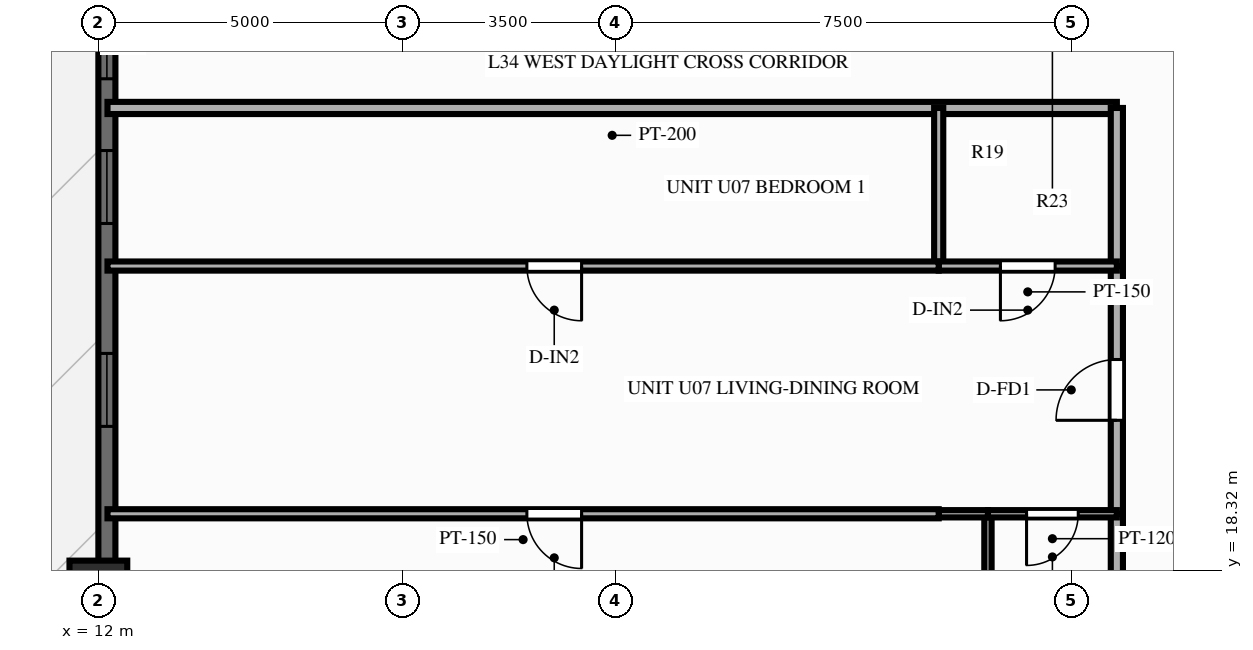
"""IFC4 building model, lengths in metres.
Left out: names, types, materials, properties, quantities, classifications, styles, units other than length and angle.
Written with IfcOpenShell. Run it as: python <this file> out.ifc"""

import sys

from ifc_helpers import new_model, si_unit, direction, frame, frame_2d, origin, origin_2d, place, context, subcontext, project, spatial, rectangle, extrude, source, transform, mapped, element, fill, save


model = new_model("IFC4")
c1 = context("Model", 3, precision=1e-05, world=origin(), true_north=direction((0.0, 1.0)))
c2 = subcontext(c1, "Body", "Model", "MODEL_VIEW")
j1 = project(units=[si_unit("LENGTHUNIT", "METRE"), si_unit("PLANEANGLEUNIT", "RADIAN")], contexts=[c1])
p1 = place(None, origin())
s1 = spatial("IfcSite", under=j1, at=p1, CompositionType="ELEMENT")
p2 = place(p1, origin())
s2 = spatial("IfcBuilding", under=s1, at=p2, CompositionType="ELEMENT")
p3 = place(p2, frame((0.0, 0.0, 107.85)))
s3 = spatial("IfcBuildingStorey", under=s2, at=p3, CompositionType="ELEMENT", Elevation=107.85)
m1 = source(origin(), c2, "Body", "SweptSolid", [
    extrude(rectangle(XDim=0.95, YDim=0.95, at=origin_2d()), origin(), (0.0, 0.0, 1.0), 3.0),
])
p4 = place(p3, frame((12.0, 18.0, 0.0), z_axis=(0.0, 0.0, 1.0), x_axis=(1.0, 0.0, 0.0)))
e1 = element("IfcColumn", 1, at=p4, inside=s3, PredefinedType="COLUMN", context=c2, shape_type="MappedRepresentation", body=[
    mapped(m1, transform((0.0, 0.0, 0.0), scale=1.0)),
])
p5 = place(p3, frame((12.14, 7.2, 0.0), z_axis=(0.0, 0.0, 1.0), x_axis=(0.0, 1.0, 0.0)))
e2 = element("IfcWall", 2, at=p5, inside=s3, PredefinedType="SOLIDWALL", context=c2, shape_type="SweptSolid", body=[
    extrude(rectangle(XDim=39.6, YDim=0.28, at=frame_2d((19.8, 0.0))), origin(), (0.0, 0.0, 1.0), 2.28),
])
p6 = place(p5, frame((0.945, 0.0, 0.25)))
e3 = element("IfcOpeningElement", 3, at=p6, cuts=e2, PredefinedType="OPENING", context=c2, shape_type="SweptSolid", body=[
    extrude(rectangle(XDim=1.2, YDim=1.5, at=frame_2d((0.6, 0.75))), frame((0.0, 0.152, 0.0), z_axis=(0.0, -1.0, 0.0), x_axis=(1.0, 0.0, 0.0)), (0.0, 0.0, 1.0), 0.304),
])
p7 = place(p5, frame((4.213, 0.0, 0.25)))
e4 = element("IfcOpeningElement", 4, at=p7, cuts=e2, PredefinedType="OPENING", context=c2, shape_type="SweptSolid", body=[
    extrude(rectangle(XDim=1.2, YDim=1.5, at=frame_2d((0.6, 0.75))), frame((0.0, 0.152, 0.0), z_axis=(0.0, -1.0, 0.0), x_axis=(1.0, 0.0, 0.0)), (0.0, 0.0, 1.0), 0.304),
])
p8 = place(p5, frame((7.55, 0.0, 0.25)))
e5 = element("IfcOpeningElement", 5, at=p8, cuts=e2, PredefinedType="OPENING", context=c2, shape_type="SweptSolid", body=[
    extrude(rectangle(XDim=1.2, YDim=1.5, at=frame_2d((0.6, 0.75))), frame((0.0, 0.152, 0.0), z_axis=(0.0, -1.0, 0.0), x_axis=(1.0, 0.0, 0.0)), (0.0, 0.0, 1.0), 0.304),
])
p9 = place(p5, frame((13.483, 0.0, 0.25)))
e6 = element("IfcOpeningElement", 6, at=p9, cuts=e2, PredefinedType="OPENING", context=c2, shape_type="SweptSolid", body=[
    extrude(rectangle(XDim=1.2, YDim=1.5, at=frame_2d((0.6, 0.75))), frame((0.0, 0.152, 0.0), z_axis=(0.0, -1.0, 0.0), x_axis=(1.0, 0.0, 0.0)), (0.0, 0.0, 1.0), 0.304),
])
p10 = place(p5, frame((16.82, 0.0, 0.25)))
e7 = element("IfcOpeningElement", 7, at=p10, cuts=e2, PredefinedType="OPENING", context=c2, shape_type="SweptSolid", body=[
    extrude(rectangle(XDim=1.2, YDim=1.5, at=frame_2d((0.6, 0.75))), frame((0.0, 0.152, 0.0), z_axis=(0.0, -1.0, 0.0), x_axis=(1.0, 0.0, 0.0)), (0.0, 0.0, 1.0), 0.304),
])
p11 = place(p5, frame((19.2, 0.0, 0.25)))
e8 = element("IfcOpeningElement", 8, at=p11, cuts=e2, PredefinedType="OPENING", context=c2, shape_type="SweptSolid", body=[
    extrude(rectangle(XDim=1.2, YDim=1.5, at=frame_2d((0.6, 0.75))), frame((0.0, 0.152, 0.0), z_axis=(0.0, -1.0, 0.0), x_axis=(1.0, 0.0, 0.0)), (0.0, 0.0, 1.0), 0.304),
])
p12 = place(p5, frame((21.578, 0.0, 0.25)))
e9 = element("IfcOpeningElement", 9, at=p12, cuts=e2, PredefinedType="OPENING", context=c2, shape_type="SweptSolid", body=[
    extrude(rectangle(XDim=1.2, YDim=1.5, at=frame_2d((0.6, 0.75))), frame((0.0, 0.152, 0.0), z_axis=(0.0, -1.0, 0.0), x_axis=(1.0, 0.0, 0.0)), (0.0, 0.0, 1.0), 0.304),
])
p13 = place(p5, frame((24.713, 0.0, 0.0)))
e10 = element("IfcOpeningElement", 10, at=p13, cuts=e2, PredefinedType="OPENING", context=c2, shape_type="SweptSolid", body=[
    extrude(rectangle(XDim=1.6, YDim=2.15, at=frame_2d((0.8, 1.075))), frame((0.0, 0.152, 0.0), z_axis=(0.0, -1.0, 0.0), x_axis=(1.0, 0.0, 0.0)), (0.0, 0.0, 1.0), 0.304),
])
p14 = place(p5, frame((29.305, 0.0, 0.25)))
e11 = element("IfcOpeningElement", 11, at=p14, cuts=e2, PredefinedType="OPENING", context=c2, shape_type="SweptSolid", body=[
    extrude(rectangle(XDim=0.7, YDim=1.5, at=frame_2d((0.35, 0.75))), frame((0.0, 0.152, 0.0), z_axis=(0.0, -1.0, 0.0), x_axis=(1.0, 0.0, 0.0)), (0.0, 0.0, 1.0), 0.304),
])
p15 = place(p5, frame((30.848, 0.0, 0.25)))
e12 = element("IfcOpeningElement", 12, at=p15, cuts=e2, PredefinedType="OPENING", context=c2, shape_type="SweptSolid", body=[
    extrude(rectangle(XDim=1.2, YDim=1.5, at=frame_2d((0.6, 0.75))), frame((0.0, 0.152, 0.0), z_axis=(0.0, -1.0, 0.0), x_axis=(1.0, 0.0, 0.0)), (0.0, 0.0, 1.0), 0.304),
])
p16 = place(p5, frame((34.183, 0.0, 0.25)))
e13 = element("IfcOpeningElement", 13, at=p16, cuts=e2, PredefinedType="OPENING", context=c2, shape_type="SweptSolid", body=[
    extrude(rectangle(XDim=1.2, YDim=1.5, at=frame_2d((0.6, 0.75))), frame((0.0, 0.152, 0.0), z_axis=(0.0, -1.0, 0.0), x_axis=(1.0, 0.0, 0.0)), (0.0, 0.0, 1.0), 0.304),
])
p17 = place(p5, frame((37.452, 0.0, 0.25)))
e14 = element("IfcOpeningElement", 14, at=p17, cuts=e2, PredefinedType="OPENING", context=c2, shape_type="SweptSolid", body=[
    extrude(rectangle(XDim=1.2, YDim=1.5, at=frame_2d((0.6, 0.75))), frame((0.0, 0.152, 0.0), z_axis=(0.0, -1.0, 0.0), x_axis=(1.0, 0.0, 0.0)), (0.0, 0.0, 1.0), 0.304),
])
p18 = place(p3, frame((28.75, 25.92, 0.0), z_axis=(0.0, 0.0, 1.0), x_axis=(-1.0, 0.0, 0.0)))
e15 = element("IfcWall", 15, at=p18, inside=s3, PredefinedType="PARTITIONING", context=c2, shape_type="SweptSolid", body=[
    extrude(rectangle(XDim=16.6, YDim=0.2, at=frame_2d((8.3, 0.0))), origin(), (0.0, 0.0, 1.0), 2.79),
])
p19 = place(p3, frame((28.75, 16.65, 0.0), z_axis=(0.0, 0.0, 1.0), x_axis=(0.0, 1.0, 0.0)))
e16 = element("IfcWall", 16, at=p19, inside=s3, PredefinedType="PARTITIONING", context=c2, shape_type="SweptSolid", body=[
    extrude(rectangle(XDim=2.596, YDim=0.2, at=frame_2d((1.298, 0.0))), origin(), (0.0, 0.0, 1.0), 2.79),
])
p20 = place(p3, frame((28.75, 19.246, 0.0), z_axis=(0.0, 0.0, 1.0), x_axis=(0.0, 1.0, 0.0)))
e17 = element("IfcWall", 17, at=p20, inside=s3, PredefinedType="PARTITIONING", context=c2, shape_type="SweptSolid", body=[
    extrude(rectangle(XDim=4.074, YDim=0.2, at=frame_2d((2.037, 0.0))), origin(), (0.0, 0.0, 1.0), 2.79),
])
p21 = place(p20, frame((1.537, 0.0, 0.0)))
e18 = element("IfcOpeningElement", 18, at=p21, cuts=e17, PredefinedType="OPENING", context=c2, shape_type="SweptSolid", body=[
    extrude(rectangle(XDim=1.0, YDim=2.15, at=frame_2d((0.5, 1.075))), frame((0.0, 0.112, 0.0), z_axis=(0.0, -1.0, 0.0), x_axis=(1.0, 0.0, 0.0)), (0.0, 0.0, 1.0), 0.224),
])
p22 = place(p3, frame((28.75, 23.32, 0.0), z_axis=(0.0, 0.0, 1.0), x_axis=(0.0, 1.0, 0.0)))
e19 = element("IfcWall", 19, at=p22, inside=s3, PredefinedType="PARTITIONING", context=c2, shape_type="SweptSolid", body=[
    extrude(rectangle(XDim=2.6, YDim=0.2, at=frame_2d((1.3, 0.0))), origin(), (0.0, 0.0, 1.0), 2.79),
])
p23 = place(p3, frame((26.63, 16.65, 0.0), z_axis=(0.0, 0.0, 1.0), x_axis=(0.0, 1.0, 0.0)))
e20 = element("IfcWall", 20, at=p23, inside=s3, PredefinedType="PARTITIONING", context=c2, shape_type="SweptSolid", body=[
    extrude(rectangle(XDim=2.596, YDim=0.12, at=frame_2d((1.298, 0.0))), origin(), (0.0, 0.0, 1.0), 2.79),
])
p24 = place(p3, frame((25.82, 23.32, 0.0), z_axis=(0.0, 0.0, 1.0), x_axis=(0.0, 1.0, 0.0)))
e21 = element("IfcWall", 21, at=p24, inside=s3, PredefinedType="PARTITIONING", context=c2, shape_type="SweptSolid", body=[
    extrude(rectangle(XDim=2.6, YDim=0.15, at=frame_2d((1.3, 0.0))), origin(), (0.0, 0.0, 1.0), 2.79),
])
p25 = place(p3, frame((28.75, 19.246, 0.0), z_axis=(0.0, 0.0, 1.0), x_axis=(-1.0, 0.0, 0.0)))
e22 = element("IfcWall", 22, at=p25, inside=s3, PredefinedType="PARTITIONING", context=c2, shape_type="SweptSolid", body=[
    extrude(rectangle(XDim=2.12, YDim=0.12, at=frame_2d((1.06, 0.0))), origin(), (0.0, 0.0, 1.0), 2.79),
])
p26 = place(p25, frame((0.635, 0.0, 0.0)))
e23 = element("IfcOpeningElement", 23, at=p26, cuts=e22, PredefinedType="OPENING", context=c2, shape_type="SweptSolid", body=[
    extrude(rectangle(XDim=0.85, YDim=2.05, at=frame_2d((0.425, 1.025))), frame((0.0, 0.072, 0.0), z_axis=(0.0, -1.0, 0.0), x_axis=(1.0, 0.0, 0.0)), (0.0, 0.0, 1.0), 0.144),
])
p27 = place(p3, frame((26.63, 19.246, 0.0), z_axis=(0.0, 0.0, 1.0), x_axis=(-1.0, 0.0, 0.0)))
e24 = element("IfcWall", 24, at=p27, inside=s3, PredefinedType="PARTITIONING", context=c2, shape_type="SweptSolid", body=[
    extrude(rectangle(XDim=0.81, YDim=0.12, at=frame_2d((0.405, 0.0))), origin(), (0.0, 0.0, 1.0), 2.79),
])
p28 = place(p3, frame((25.82, 19.246, 0.0), z_axis=(0.0, 0.0, 1.0), x_axis=(-1.0, 0.0, 0.0)))
e25 = element("IfcWall", 25, at=p28, inside=s3, PredefinedType="PARTITIONING", context=c2, shape_type="SweptSolid", body=[
    extrude(rectangle(XDim=13.67, YDim=0.15, at=frame_2d((6.835, 0.0))), origin(), (0.0, 0.0, 1.0), 2.79),
])
p29 = place(p28, frame((5.873, 0.0, 0.0)))
e26 = element("IfcOpeningElement", 26, at=p29, cuts=e25, PredefinedType="OPENING", context=c2, shape_type="SweptSolid", body=[
    extrude(rectangle(XDim=0.9, YDim=2.1, at=frame_2d((0.45, 1.05))), frame((0.0, 0.087, 0.0), z_axis=(0.0, -1.0, 0.0), x_axis=(1.0, 0.0, 0.0)), (0.0, 0.0, 1.0), 0.174),
])
p30 = place(p3, frame((28.75, 23.32, 0.0), z_axis=(0.0, 0.0, 1.0), x_axis=(-1.0, 0.0, 0.0)))
e27 = element("IfcWall", 27, at=p30, inside=s3, PredefinedType="PARTITIONING", context=c2, shape_type="SweptSolid", body=[
    extrude(rectangle(XDim=2.93, YDim=0.15, at=frame_2d((1.465, 0.0))), origin(), (0.0, 0.0, 1.0), 2.79),
])
p31 = place(p30, frame((1.015, 0.0, 0.0)))
e28 = element("IfcOpeningElement", 28, at=p31, cuts=e27, PredefinedType="OPENING", context=c2, shape_type="SweptSolid", body=[
    extrude(rectangle(XDim=0.9, YDim=2.1, at=frame_2d((0.45, 1.05))), frame((0.0, 0.087, 0.0), z_axis=(0.0, -1.0, 0.0), x_axis=(1.0, 0.0, 0.0)), (0.0, 0.0, 1.0), 0.174),
])
p32 = place(p3, frame((25.82, 23.32, 0.0), z_axis=(0.0, 0.0, 1.0), x_axis=(-1.0, 0.0, 0.0)))
e29 = element("IfcWall", 29, at=p32, inside=s3, PredefinedType="PARTITIONING", context=c2, shape_type="SweptSolid", body=[
    extrude(rectangle(XDim=13.67, YDim=0.15, at=frame_2d((6.835, 0.0))), origin(), (0.0, 0.0, 1.0), 2.79),
])
p33 = place(p32, frame((5.873, 0.0, 0.0)))
e30 = element("IfcOpeningElement", 30, at=p33, cuts=e29, PredefinedType="OPENING", context=c2, shape_type="SweptSolid", body=[
    extrude(rectangle(XDim=0.9, YDim=2.1, at=frame_2d((0.45, 1.05))), frame((0.0, 0.087, 0.0), z_axis=(0.0, -1.0, 0.0), x_axis=(1.0, 0.0, 0.0)), (0.0, 0.0, 1.0), 0.174),
])
m2 = source(origin(), c2, "Body", "SweptSolid", [
    extrude(rectangle(XDim=1.2, YDim=1.5, at=frame_2d((0.6, 0.75))), frame((0.0, 0.03, 0.0), z_axis=(0.0, -1.0, 0.0), x_axis=(1.0, 0.0, 0.0)), (0.0, 0.0, 1.0), 0.06),
])
p34 = place(p9, origin())
e31 = element("IfcWindow", 31, at=p34, inside=s3, PartitioningType="SINGLE_PANEL", PredefinedType="WINDOW", context=c2, shape_type="MappedRepresentation", body=[
    mapped(m2, transform((0.0, 0.0, 0.0), scale=1.0)),
])
fill(e6, e31)
p35 = place(p10, origin())
e32 = element("IfcWindow", 32, at=p35, inside=s3, PartitioningType="SINGLE_PANEL", PredefinedType="WINDOW", context=c2, shape_type="MappedRepresentation", body=[
    mapped(m2, transform((0.0, 0.0, 0.0), scale=1.0)),
])
fill(e7, e32)
p36 = place(p11, origin())
e33 = element("IfcWindow", 33, at=p36, inside=s3, PartitioningType="SINGLE_PANEL", PredefinedType="WINDOW", context=c2, shape_type="MappedRepresentation", body=[
    mapped(m2, transform((0.0, 0.0, 0.0), scale=1.0)),
])
fill(e8, e33)
m3 = source(origin(), c2, "Body", "SweptSolid", [
    extrude(rectangle(XDim=1.0, YDim=2.15, at=frame_2d((0.5, 1.075))), frame((0.0, 0.025, 0.0), z_axis=(0.0, -1.0, 0.0), x_axis=(1.0, 0.0, 0.0)), (0.0, 0.0, 1.0), 0.05),
])
p37 = place(p21, origin())
e34 = element("IfcDoor", 34, at=p37, inside=s3, OperationType="SINGLE_SWING_LEFT", PredefinedType="DOOR", context=c2, shape_type="MappedRepresentation", body=[
    mapped(m3, transform((0.0, 0.0, 0.0), scale=1.0)),
])
fill(e18, e34)
m4 = source(origin(), c2, "Body", "SweptSolid", [
    extrude(rectangle(XDim=0.85, YDim=2.05, at=frame_2d((0.425, 1.025))), frame((0.0, 0.025, 0.0), z_axis=(0.0, -1.0, 0.0), x_axis=(1.0, 0.0, 0.0)), (0.0, 0.0, 1.0), 0.05),
])
p38 = place(p26, origin())
e35 = element("IfcDoor", 35, at=p38, inside=s3, OperationType="SINGLE_SWING_RIGHT", PredefinedType="DOOR", context=c2, shape_type="MappedRepresentation", body=[
    mapped(m4, transform((0.0, 0.0, 0.0), scale=1.0)),
])
fill(e23, e35)
m5 = source(origin(), c2, "Body", "SweptSolid", [
    extrude(rectangle(XDim=0.9, YDim=2.1, at=frame_2d((0.45, 1.05))), frame((0.0, 0.025, 0.0), z_axis=(0.0, -1.0, 0.0), x_axis=(1.0, 0.0, 0.0)), (0.0, 0.0, 1.0), 0.05),
])
p39 = place(p29, origin())
e36 = element("IfcDoor", 36, at=p39, inside=s3, OperationType="SINGLE_SWING_LEFT", PredefinedType="DOOR", context=c2, shape_type="MappedRepresentation", body=[
    mapped(m5, transform((0.0, 0.0, 0.0), scale=1.0)),
])
fill(e26, e36)
p40 = place(p31, origin())
e37 = element("IfcDoor", 37, at=p40, inside=s3, OperationType="SINGLE_SWING_RIGHT", PredefinedType="DOOR", context=c2, shape_type="MappedRepresentation", body=[
    mapped(m5, transform((0.0, 0.0, 0.0), scale=1.0)),
])
fill(e28, e37)
p41 = place(p33, origin())
e38 = element("IfcDoor", 38, at=p41, inside=s3, OperationType="SINGLE_SWING_LEFT", PredefinedType="DOOR", context=c2, shape_type="MappedRepresentation", body=[
    mapped(m5, transform((0.0, 0.0, 0.0), scale=1.0)),
])
fill(e30, e38)
save(model, sys.argv[1])
